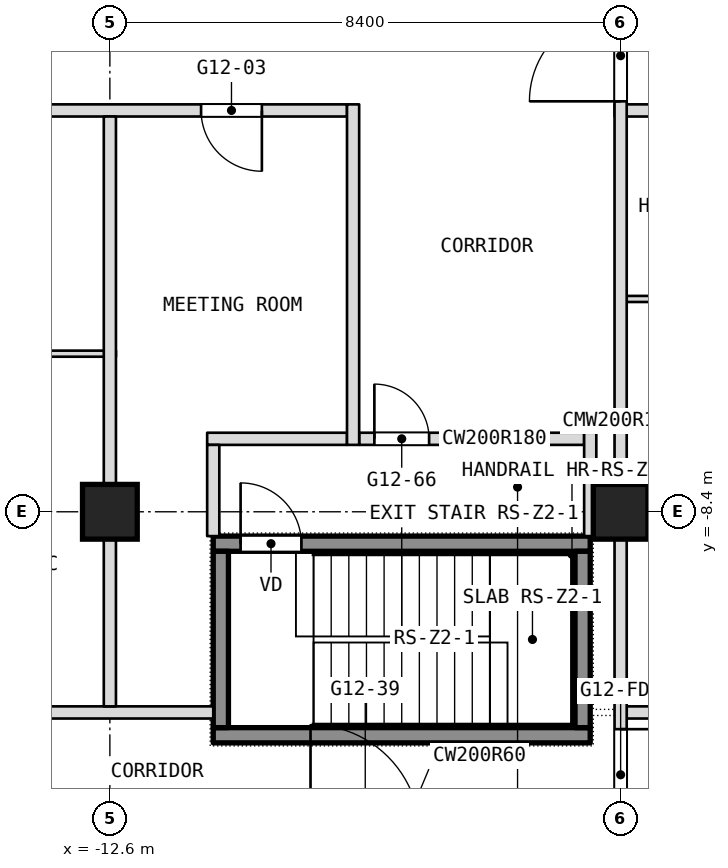
"""IFC4 building model, lengths in metres.
Left out: names, types, materials, properties, quantities, classifications, styles, units other than length and angle.
Written with IfcOpenShell. Run it as: python <this file> out.ifc"""

import sys

from ifc_helpers import new_model, si_unit, direction, frame, frame_2d, origin, origin_2d, place, context, subcontext, project, spatial, rectangle, extrude, element, fill, save


model = new_model("IFC4")
c1 = context("Model", 3, precision=1e-05, world=origin(), true_north=direction((0.0, 1.0)))
c2 = subcontext(c1, "Body", "Model", "MODEL_VIEW")
j1 = project(units=[si_unit("LENGTHUNIT", "METRE"), si_unit("PLANEANGLEUNIT", "RADIAN")], contexts=[c1])
p1 = place(None, origin())
s1 = spatial("IfcSite", under=j1, at=p1, CompositionType="ELEMENT")
p2 = place(p1, origin())
s2 = spatial("IfcBuilding", under=s1, at=p2, CompositionType="ELEMENT")
p3 = place(p2, frame((0.0, 0.0, 144.5)))
s3 = spatial("IfcBuildingStorey", under=s2, at=p3, CompositionType="ELEMENT", Elevation=144.5)
for number, where, z_axis, x_axis in (
    (1, (-12.6, -8.4, 0.0), (0.0, 0.0, 1.0), (1.0, 0.0, 0.0)),
    (2, (-4.2, -8.4, 0.0), (0.0, 0.0, 1.0), (1.0, 0.0, 0.0)),
):
    element("IfcColumn", number, at=place(p3, frame(where, z_axis=z_axis, x_axis=x_axis)), inside=s3, PredefinedType="COLUMN", context=c2, shape_type="SweptSolid", body=[
        extrude(rectangle(XDim=0.9, YDim=0.9, at=origin_2d()), origin(), (0.0, 0.0, 1.0), 3.6),
    ])
p4 = place(p3, frame((-16.7, -11.7, 0.0), z_axis=(0.0, 0.0, 1.0), x_axis=(1.0, 0.0, 0.0)))
e3 = element("IfcWall", 3, at=p4, inside=s3, PredefinedType="PARTITIONING", context=c2, shape_type="SweptSolid", body=[
    extrude(rectangle(XDim=5.8, YDim=0.2, at=frame_2d((2.9, 0.0))), origin(), (0.0, 0.0, 1.0), 3.34),
])
p5 = place(p3, frame((-4.1, -11.7, 0.0), z_axis=(0.0, 0.0, 1.0), x_axis=(1.0, 0.0, 0.0)))
e4 = element("IfcWall", 4, at=p5, inside=s3, PredefinedType="PARTITIONING", context=c2, shape_type="SweptSolid", body=[
    extrude(rectangle(XDim=20.8, YDim=0.2, at=frame_2d((10.4, 0.0))), origin(), (0.0, 0.0, 1.0), 3.34),
])
p6 = place(p5, frame((14.1, 0.0, 0.0)))
e5 = element("IfcOpeningElement", 5, at=p6, cuts=e4, PredefinedType="OPENING", context=c2, shape_type="SweptSolid", body=[
    extrude(rectangle(XDim=1.0, YDim=2.1, at=frame_2d((0.5, 1.05))), frame((0.0, 0.1, 0.0), z_axis=(0.0, -1.0, 0.0), x_axis=(1.0, 0.0, 0.0)), (0.0, 0.0, 1.0), 0.2),
])
p7 = place(p5, frame((5.7, 0.0, 0.0)))
e6 = element("IfcOpeningElement", 6, at=p7, cuts=e4, PredefinedType="OPENING", context=c2, shape_type="SweptSolid", body=[
    extrude(rectangle(XDim=1.0, YDim=2.1, at=frame_2d((0.5, 1.05))), frame((0.0, 0.1, 0.0), z_axis=(0.0, -1.0, 0.0), x_axis=(1.0, 0.0, 0.0)), (0.0, 0.0, 1.0), 0.2),
])
p8 = place(p3, frame((-11.0, -7.2, 0.0), z_axis=(0.0, 0.0, 1.0), x_axis=(1.0, 0.0, 0.0)))
e7 = element("IfcWall", 7, at=p8, inside=s3, PredefinedType="PARTITIONING", context=c2, shape_type="SweptSolid", body=[
    extrude(rectangle(XDim=2.3, YDim=0.2, at=frame_2d((1.15, 0.0))), origin(), (0.0, 0.0, 1.0), 3.34),
])
p9 = place(p3, frame((-8.5, -7.2, 0.0), z_axis=(0.0, 0.0, 1.0), x_axis=(1.0, 0.0, 0.0)))
e8 = element("IfcWall", 8, at=p9, inside=s3, PredefinedType="PARTITIONING", context=c2, shape_type="SweptSolid", body=[
    extrude(rectangle(XDim=3.7, YDim=0.2, at=frame_2d((1.85, 0.0))), origin(), (0.0, 0.0, 1.0), 3.34),
])
p10 = place(p9, frame((0.25, 0.0, 0.0)))
e9 = element("IfcOpeningElement", 9, at=p10, cuts=e8, PredefinedType="OPENING", context=c2, shape_type="SweptSolid", body=[
    extrude(rectangle(XDim=0.9, YDim=2.1, at=frame_2d((0.45, 1.05))), frame((0.0, 0.1, 0.0), z_axis=(0.0, -1.0, 0.0), x_axis=(1.0, 0.0, 0.0)), (0.0, 0.0, 1.0), 0.2),
])
p11 = place(p3, frame((-16.7, -5.8, 0.0), z_axis=(0.0, 0.0, 1.0), x_axis=(1.0, 0.0, 0.0)))
e10 = element("IfcWall", 10, at=p11, inside=s3, PredefinedType="PARTITIONING", context=c2, shape_type="SweptSolid", body=[
    extrude(rectangle(XDim=4.2, YDim=0.1, at=frame_2d((2.1, 0.0))), origin(), (0.0, 0.0, 1.0), 3.34),
])
p12 = place(p11, frame((1.55, 0.0, 0.0)))
e11 = element("IfcOpeningElement", 11, at=p12, cuts=e10, PredefinedType="OPENING", context=c2, shape_type="SweptSolid", body=[
    extrude(rectangle(XDim=0.9, YDim=2.1, at=frame_2d((0.45, 1.05))), frame((0.0, 0.05, 0.0), z_axis=(0.0, -1.0, 0.0), x_axis=(1.0, 0.0, 0.0)), (0.0, 0.0, 1.0), 0.1),
])
p13 = place(p3, frame((-4.1, -4.9, 0.0), z_axis=(0.0, 0.0, 1.0), x_axis=(1.0, 0.0, 0.0)))
e12 = element("IfcWall", 12, at=p13, inside=s3, PredefinedType="PARTITIONING", context=c2, shape_type="SweptSolid", body=[
    extrude(rectangle(XDim=4.2, YDim=0.1, at=frame_2d((2.1, 0.0))), origin(), (0.0, 0.0, 1.0), 3.34),
])
p14 = place(p13, frame((1.55, 0.0, 0.0)))
e13 = element("IfcOpeningElement", 13, at=p14, cuts=e12, PredefinedType="OPENING", context=c2, shape_type="SweptSolid", body=[
    extrude(rectangle(XDim=0.9, YDim=2.1, at=frame_2d((0.45, 1.05))), frame((0.0, 0.05, 0.0), z_axis=(0.0, -1.0, 0.0), x_axis=(1.0, 0.0, 0.0)), (0.0, 0.0, 1.0), 0.1),
])
p15 = place(p3, frame((-16.9, -1.8, 0.0), z_axis=(0.0, 0.0, 1.0), x_axis=(1.0, 0.0, 0.0)))
e14 = element("IfcWall", 14, at=p15, inside=s3, PredefinedType="PARTITIONING", context=c2, shape_type="SweptSolid", body=[
    extrude(rectangle(XDim=8.2, YDim=0.2, at=frame_2d((4.1, 0.0))), origin(), (0.0, 0.0, 1.0), 3.34),
])
p16 = place(p15, frame((1.7, 0.0, 0.0)))
e15 = element("IfcOpeningElement", 15, at=p16, cuts=e14, PredefinedType="OPENING", context=c2, shape_type="SweptSolid", body=[
    extrude(rectangle(XDim=1.0, YDim=2.1, at=frame_2d((0.5, 1.05))), frame((0.0, 0.1, 0.0), z_axis=(0.0, -1.0, 0.0), x_axis=(1.0, 0.0, 0.0)), (0.0, 0.0, 1.0), 0.2),
])
p17 = place(p15, frame((5.8, 0.0, 0.0)))
e16 = element("IfcOpeningElement", 16, at=p17, cuts=e14, PredefinedType="OPENING", context=c2, shape_type="SweptSolid", body=[
    extrude(rectangle(XDim=1.0, YDim=2.1, at=frame_2d((0.5, 1.05))), frame((0.0, 0.1, 0.0), z_axis=(0.0, -1.0, 0.0), x_axis=(1.0, 0.0, 0.0)), (0.0, 0.0, 1.0), 0.2),
])
p18 = place(p3, frame((-4.3, -1.8, 0.0), z_axis=(0.0, 0.0, 1.0), x_axis=(1.0, 0.0, 0.0)))
e17 = element("IfcWall", 17, at=p18, inside=s3, PredefinedType="PARTITIONING", context=c2, shape_type="SweptSolid", body=[
    extrude(rectangle(XDim=11.3, YDim=0.2, at=frame_2d((5.65, 0.0))), origin(), (0.0, 0.0, 1.0), 3.34),
])
p19 = place(p18, frame((1.7, 0.0, 0.0)))
e18 = element("IfcOpeningElement", 18, at=p19, cuts=e17, PredefinedType="OPENING", context=c2, shape_type="SweptSolid", body=[
    extrude(rectangle(XDim=1.0, YDim=2.1, at=frame_2d((0.5, 1.05))), frame((0.0, 0.1, 0.0), z_axis=(0.0, -1.0, 0.0), x_axis=(1.0, 0.0, 0.0)), (0.0, 0.0, 1.0), 0.2),
])
p20 = place(p18, frame((10.1, 0.0, 0.0)))
e19 = element("IfcOpeningElement", 19, at=p20, cuts=e17, PredefinedType="OPENING", context=c2, shape_type="SweptSolid", body=[
    extrude(rectangle(XDim=1.0, YDim=2.1, at=frame_2d((0.5, 1.05))), frame((0.0, 0.1, 0.0), z_axis=(0.0, -1.0, 0.0), x_axis=(1.0, 0.0, 0.0)), (0.0, 0.0, 1.0), 0.2),
])
p21 = place(p18, frame((5.9, 0.0, 0.0)))
e20 = element("IfcOpeningElement", 20, at=p21, cuts=e17, PredefinedType="OPENING", context=c2, shape_type="SweptSolid", body=[
    extrude(rectangle(XDim=1.0, YDim=2.1, at=frame_2d((0.5, 1.05))), frame((0.0, 0.1, 0.0), z_axis=(0.0, -1.0, 0.0), x_axis=(1.0, 0.0, 0.0)), (0.0, 0.0, 1.0), 0.2),
])
p22 = place(p3, frame((-4.2, -13.8, 0.0), z_axis=(0.0, 0.0, 1.0), x_axis=(0.0, 1.0, 0.0)))
e21 = element("IfcWall", 21, at=p22, inside=s3, PredefinedType="PARTITIONING", context=c2, shape_type="SweptSolid", body=[
    extrude(rectangle(XDim=13.8, YDim=0.2, at=frame_2d((6.9, 0.0))), origin(), (0.0, 0.0, 1.0), 3.34),
])
p23 = place(p22, frame((12.15, 0.0, 0.0)))
e22 = element("IfcOpeningElement", 22, at=p23, cuts=e21, PredefinedType="OPENING", context=c2, shape_type="SweptSolid", body=[
    extrude(rectangle(XDim=1.5, YDim=2.1, at=frame_2d((0.75, 1.05))), frame((0.0, 0.1, 0.0), z_axis=(0.0, -1.0, 0.0), x_axis=(1.0, 0.0, 0.0)), (0.0, 0.0, 1.0), 0.2),
])
p24 = place(p22, frame((0.325, 0.0, 0.0)))
e23 = element("IfcOpeningElement", 23, at=p24, cuts=e21, PredefinedType="OPENING", context=c2, shape_type="SweptSolid", body=[
    extrude(rectangle(XDim=1.5, YDim=2.1, at=frame_2d((0.75, 1.05))), frame((0.0, 0.1, 0.0), z_axis=(0.0, -1.0, 0.0), x_axis=(1.0, 0.0, 0.0)), (0.0, 0.0, 1.0), 0.2),
])
p25 = place(p3, frame((-4.7, -8.8, 0.0), z_axis=(0.0, 0.0, 1.0), x_axis=(0.0, 1.0, 0.0)))
e24 = element("IfcWall", 24, at=p25, inside=s3, PredefinedType="PARTITIONING", context=c2, shape_type="SweptSolid", body=[
    extrude(rectangle(XDim=1.7, YDim=0.2, at=frame_2d((0.85, 0.0))), origin(), (0.0, 0.0, 1.0), 3.34),
])
p26 = place(p3, frame((-8.6, -7.3, 0.0), z_axis=(0.0, 0.0, 1.0), x_axis=(0.0, 1.0, 0.0)))
e25 = element("IfcWall", 25, at=p26, inside=s3, PredefinedType="PARTITIONING", context=c2, shape_type="SweptSolid", body=[
    extrude(rectangle(XDim=5.6, YDim=0.2, at=frame_2d((2.8, 0.0))), origin(), (0.0, 0.0, 1.0), 3.34),
])
p27 = place(p3, frame((-10.9, -8.8, 0.0), z_axis=(0.0, 0.0, 1.0), x_axis=(0.0, 1.0, 0.0)))
e26 = element("IfcWall", 26, at=p27, inside=s3, PredefinedType="PARTITIONING", context=c2, shape_type="SweptSolid", body=[
    extrude(rectangle(XDim=1.5, YDim=0.2, at=frame_2d((0.75, 0.0))), origin(), (0.0, 0.0, 1.0), 3.34),
])
p28 = place(p3, frame((-12.6, -11.6, 0.0), z_axis=(0.0, 0.0, 1.0), x_axis=(0.0, 1.0, 0.0)))
e27 = element("IfcWall", 27, at=p28, inside=s3, PredefinedType="PARTITIONING", context=c2, shape_type="SweptSolid", body=[
    extrude(rectangle(XDim=9.7, YDim=0.2, at=frame_2d((4.85, 0.0))), origin(), (0.0, 0.0, 1.0), 3.34),
])
p29 = place(p3, frame((-10.9, -12.075, 0.1), z_axis=(0.0, 0.0, 1.0), x_axis=(1.0, 0.0, 0.0)))
e28 = element("IfcWall", 28, at=p29, inside=s3, PredefinedType="SHEAR", context=c2, shape_type="SweptSolid", body=[
    extrude(rectangle(XDim=6.2, YDim=0.25, at=frame_2d((3.1, 0.0))), origin(), (0.0, 0.0, 1.0), 3.6),
])
p30 = place(p3, frame((-10.9, -8.925, 0.1), z_axis=(0.0, 0.0, 1.0), x_axis=(1.0, 0.0, 0.0)))
e29 = element("IfcWall", 29, at=p30, inside=s3, PredefinedType="SHEAR", context=c2, shape_type="SweptSolid", body=[
    extrude(rectangle(XDim=6.2, YDim=0.25, at=frame_2d((3.1, 0.0))), origin(), (0.0, 0.0, 1.0), 3.6),
])
p31 = place(p30, frame((0.45, 0.0, 0.0)))
e30 = element("IfcOpeningElement", 30, at=p31, cuts=e29, PredefinedType="OPENING", context=c2, shape_type="SweptSolid", body=[
    extrude(rectangle(XDim=1.0, YDim=2.1, at=frame_2d((0.5, 1.05))), frame((0.0, 0.125, 0.0), z_axis=(0.0, -1.0, 0.0), x_axis=(1.0, 0.0, 0.0)), (0.0, 0.0, 1.0), 0.25),
])
for number, where, z_axis, x_axis in (
    (31, (-10.775, -11.95, 0.1), (0.0, 0.0, 1.0), (0.0, 1.0, 0.0)),
    (32, (-4.825, -11.95, 0.1), (0.0, 0.0, 1.0), (0.0, 1.0, 0.0)),
):
    element("IfcWall", number, at=place(p3, frame(where, z_axis=z_axis, x_axis=x_axis)), inside=s3, PredefinedType="SHEAR", context=c2, shape_type="SweptSolid", body=[
        extrude(rectangle(XDim=2.9, YDim=0.25, at=frame_2d((1.45, 0.0))), origin(), (0.0, 0.0, 1.0), 3.6),
    ])
p32 = place(p10, origin())
e33 = element("IfcDoor", 33, at=p32, inside=s3, OperationType="SINGLE_SWING_RIGHT", PredefinedType="DOOR", context=c2, shape_type="SweptSolid", body=[
    extrude(rectangle(XDim=0.9, YDim=2.1, at=frame_2d((0.45, 1.05))), frame((0.0, 0.025, 0.0), z_axis=(0.0, -1.0, 0.0), x_axis=(1.0, 0.0, 0.0)), (0.0, 0.0, 1.0), 0.05),
])
fill(e9, e33)
p33 = place(p17, origin())
e34 = element("IfcDoor", 34, at=p33, inside=s3, OperationType="SINGLE_SWING_LEFT", PredefinedType="DOOR", context=c2, shape_type="SweptSolid", body=[
    extrude(rectangle(XDim=1.0, YDim=2.1, at=frame_2d((0.5, 1.05))), frame((0.0, 0.025, 0.0), z_axis=(0.0, -1.0, 0.0), x_axis=(1.0, 0.0, 0.0)), (0.0, 0.0, 1.0), 0.05),
])
fill(e16, e34)
p34 = place(p31, origin())
e35 = element("IfcDoor", 35, at=p34, inside=s3, OperationType="SINGLE_SWING_LEFT", PredefinedType="DOOR", context=c2, shape_type="SweptSolid", body=[
    extrude(rectangle(XDim=1.0, YDim=2.1, at=frame_2d((0.5, 1.05))), frame((0.0, 0.025, 0.0), z_axis=(0.0, -1.0, 0.0), x_axis=(1.0, 0.0, 0.0)), (0.0, 0.0, 1.0), 0.05),
])
fill(e30, e35)
p35 = place(p23, origin())
e36 = element("IfcDoor", 36, at=p35, inside=s3, OperationType="DOUBLE_DOOR_DOUBLE_SWING", PredefinedType="DOOR", context=c2, shape_type="SweptSolid", body=[
    extrude(rectangle(XDim=1.5, YDim=2.1, at=frame_2d((0.75, 1.05))), frame((0.0, 0.025, 0.0), z_axis=(0.0, -1.0, 0.0), x_axis=(1.0, 0.0, 0.0)), (0.0, 0.0, 1.0), 0.05),
])
fill(e22, e36)
p36 = place(p24, origin())
e37 = element("IfcDoor", 37, at=p36, inside=s3, OperationType="DOUBLE_DOOR_DOUBLE_SWING", PredefinedType="DOOR", context=c2, shape_type="SweptSolid", body=[
    extrude(rectangle(XDim=1.5, YDim=2.1, at=frame_2d((0.75, 1.05))), frame((0.0, 0.025, 0.0), z_axis=(0.0, -1.0, 0.0), x_axis=(1.0, 0.0, 0.0)), (0.0, 0.0, 1.0), 0.05),
])
fill(e23, e37)
save(model, sys.argv[1])
